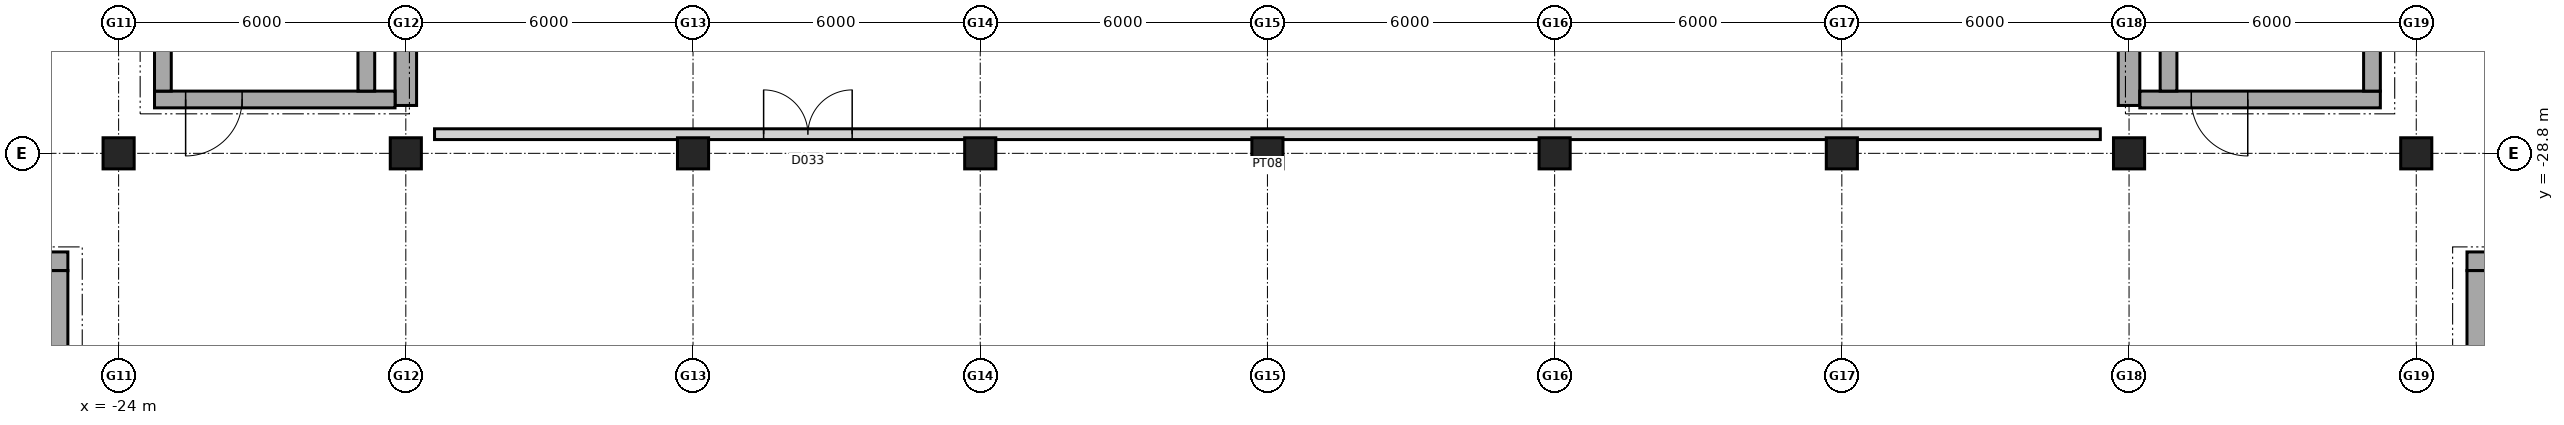
"""IFC4 building model, lengths in metres.
Left out: names, types, materials, properties, quantities, classifications, styles, units other than length and angle.
Written with IfcOpenShell. Run it as: python <this file> out.ifc"""

import sys

from ifc_helpers import new_model, si_unit, direction, frame, frame_2d, origin, origin_2d, place, context, subcontext, project, spatial, rectangle, extrude, element, fill, save


model = new_model("IFC4")
c1 = context("Model", 3, precision=1e-05, world=origin(), true_north=direction((0.0, 1.0)))
c2 = subcontext(c1, "Body", "Model", "MODEL_VIEW")
j1 = project(units=[si_unit("LENGTHUNIT", "METRE"), si_unit("PLANEANGLEUNIT", "RADIAN")], contexts=[c1])
p1 = place(None, origin())
s1 = spatial("IfcSite", under=j1, at=p1, CompositionType="ELEMENT")
p2 = place(p1, origin())
s2 = spatial("IfcBuilding", under=s1, at=p2, CompositionType="ELEMENT")
p3 = place(p2, frame((0.0, 0.0, 15.0)))
s3 = spatial("IfcBuildingStorey", under=s2, at=p3, CompositionType="ELEMENT", Elevation=15.0)
for number, where, z_axis, x_axis in (
    (1, (-24.0, -28.8, 0.0), (0.0, 0.0, 1.0), (1.0, 0.0, 0.0)),
    (2, (-18.0, -28.8, 0.0), (0.0, 0.0, 1.0), (1.0, 0.0, 0.0)),
    (3, (-12.0, -28.8, 0.0), (0.0, 0.0, 1.0), (1.0, 0.0, 0.0)),
    (4, (-6.0, -28.8, 0.0), (0.0, 0.0, 1.0), (1.0, 0.0, 0.0)),
    (5, (0.0, -28.8, 0.0), (0.0, 0.0, 1.0), (1.0, 0.0, 0.0)),
    (6, (6.0, -28.8, 0.0), (0.0, 0.0, 1.0), (1.0, 0.0, 0.0)),
    (7, (12.0, -28.8, 0.0), (0.0, 0.0, 1.0), (1.0, 0.0, 0.0)),
    (8, (18.0, -28.8, 0.0), (0.0, 0.0, 1.0), (1.0, 0.0, 0.0)),
    (9, (24.0, -28.8, 0.0), (0.0, 0.0, 1.0), (1.0, 0.0, 0.0)),
):
    element("IfcColumn", number, at=place(p3, frame(where, z_axis=z_axis, x_axis=x_axis)), inside=s3, PredefinedType="COLUMN", context=c2, shape_type="SweptSolid", body=[
        extrude(rectangle(XDim=0.65, YDim=0.65, at=origin_2d()), origin(), (0.0, 0.0, 1.0), 4.8),
    ])
for number, where, z_axis, x_axis in (
    (10, (-18.0, -27.8, 0.0), (0.0, 0.0, 1.0), (0.0, 1.0, 0.0)),
    (11, (18.0, -27.8, 0.0), (0.0, 0.0, 1.0), (0.0, 1.0, 0.0)),
):
    element("IfcWall", number, at=place(p3, frame(where, z_axis=z_axis, x_axis=x_axis)), inside=s3, PredefinedType="SHEAR", context=c2, shape_type="SweptSolid", body=[
        extrude(rectangle(XDim=18.6, YDim=0.45, at=frame_2d((9.3, 0.0))), origin(), (0.0, 0.0, 1.0), 4.8),
    ])
p4 = place(p3, frame((-18.225, -27.675, 0.0), z_axis=(0.0, 0.0, 1.0), x_axis=(-1.0, 0.0, 0.0)))
e12 = element("IfcWall", 12, at=p4, inside=s3, PredefinedType="SHEAR", context=c2, shape_type="SweptSolid", body=[
    extrude(rectangle(XDim=5.025, YDim=0.35, at=frame_2d((2.512, 0.0))), origin(), (0.0, 0.0, 1.0), 4.8),
])
p5 = place(p4, frame((3.195, 0.0, 0.0)))
e13 = element("IfcOpeningElement", 13, at=p5, cuts=e12, PredefinedType="OPENING", context=c2, shape_type="SweptSolid", body=[
    extrude(rectangle(XDim=1.18, YDim=2.15, at=frame_2d((0.59, 1.075))), frame((0.0, 0.185, 0.0), z_axis=(0.0, -1.0, 0.0), x_axis=(1.0, 0.0, 0.0)), (0.0, 0.0, 1.0), 0.37),
])
for number, where, z_axis, x_axis in (
    (14, (-23.075, -27.5, 0.0), (0.0, 0.0, 1.0), (0.0, 1.0, 0.0)),
    (15, (-18.825, -19.2, 0.0), (0.0, 0.0, 1.0), (0.0, -1.0, 0.0)),
):
    element("IfcWall", number, at=place(p3, frame(where, z_axis=z_axis, x_axis=x_axis)), inside=s3, PredefinedType="SHEAR", context=c2, shape_type="SweptSolid", body=[
        extrude(rectangle(XDim=8.3, YDim=0.35, at=frame_2d((4.15, 0.0))), origin(), (0.0, 0.0, 1.0), 4.8),
    ])
p6 = place(p3, frame((23.25, -27.675, 0.0), z_axis=(0.0, 0.0, 1.0), x_axis=(-1.0, 0.0, 0.0)))
e16 = element("IfcWall", 16, at=p6, inside=s3, PredefinedType="SHEAR", context=c2, shape_type="SweptSolid", body=[
    extrude(rectangle(XDim=5.025, YDim=0.35, at=frame_2d((2.512, 0.0))), origin(), (0.0, 0.0, 1.0), 4.8),
])
p7 = place(p6, frame((2.77, 0.0, 0.0)))
e17 = element("IfcOpeningElement", 17, at=p7, cuts=e16, PredefinedType="OPENING", context=c2, shape_type="SweptSolid", body=[
    extrude(rectangle(XDim=1.18, YDim=2.15, at=frame_2d((0.59, 1.075))), frame((0.0, 0.185, 0.0), z_axis=(0.0, -1.0, 0.0), x_axis=(1.0, 0.0, 0.0)), (0.0, 0.0, 1.0), 0.37),
])
for number, where, z_axis, x_axis in (
    (18, (18.825, -27.5, 0.0), (0.0, 0.0, 1.0), (0.0, 1.0, 0.0)),
    (19, (23.075, -19.2, 0.0), (0.0, 0.0, 1.0), (0.0, -1.0, 0.0)),
):
    element("IfcWall", number, at=place(p3, frame(where, z_axis=z_axis, x_axis=x_axis)), inside=s3, PredefinedType="SHEAR", context=c2, shape_type="SweptSolid", body=[
        extrude(rectangle(XDim=8.3, YDim=0.35, at=frame_2d((4.15, 0.0))), origin(), (0.0, 0.0, 1.0), 4.8),
    ])
p8 = place(p3, frame((-28.54, -31.055, 0.0), z_axis=(0.0, 0.0, 1.0), x_axis=(1.0, 0.0, 0.0)))
e20 = element("IfcWall", 20, at=p8, inside=s3, PredefinedType="SHEAR", context=c2, shape_type="SweptSolid", body=[
    extrude(rectangle(XDim=3.48, YDim=0.39, at=frame_2d((1.74, 0.0))), origin(), (0.0, 0.0, 1.0), 4.8),
])
p9 = place(p8, frame((1.19, 0.0, 0.0)))
e21 = element("IfcOpeningElement", 21, at=p9, cuts=e20, PredefinedType="OPENING", context=c2, shape_type="SweptSolid", body=[
    extrude(rectangle(XDim=1.1, YDim=2.15, at=frame_2d((0.55, 1.075))), frame((0.0, 0.205, 0.0), z_axis=(0.0, -1.0, 0.0), x_axis=(1.0, 0.0, 0.0)), (0.0, 0.0, 1.0), 0.41),
])
p10 = place(p3, frame((-25.255, -31.25, 0.0), z_axis=(0.0, 0.0, 1.0), x_axis=(0.0, -1.0, 0.0)))
e22 = element("IfcWall", 22, at=p10, inside=s3, PredefinedType="SHEAR", context=c2, shape_type="SweptSolid", body=[
    extrude(rectangle(XDim=2.3, YDim=0.39, at=frame_2d((1.15, 0.0))), origin(), (0.0, 0.0, 1.0), 4.8),
])
p11 = place(p3, frame((25.06, -31.055, 0.0), z_axis=(0.0, 0.0, 1.0), x_axis=(1.0, 0.0, 0.0)))
e23 = element("IfcWall", 23, at=p11, inside=s3, PredefinedType="SHEAR", context=c2, shape_type="SweptSolid", body=[
    extrude(rectangle(XDim=3.48, YDim=0.39, at=frame_2d((1.74, 0.0))), origin(), (0.0, 0.0, 1.0), 4.8),
])
p12 = place(p11, frame((1.19, 0.0, 0.0)))
e24 = element("IfcOpeningElement", 24, at=p12, cuts=e23, PredefinedType="OPENING", context=c2, shape_type="SweptSolid", body=[
    extrude(rectangle(XDim=1.1, YDim=2.15, at=frame_2d((0.55, 1.075))), frame((0.0, 0.205, 0.0), z_axis=(0.0, -1.0, 0.0), x_axis=(1.0, 0.0, 0.0)), (0.0, 0.0, 1.0), 0.41),
])
p13 = place(p3, frame((25.255, -33.55, 0.0), z_axis=(0.0, 0.0, 1.0), x_axis=(0.0, 1.0, 0.0)))
e25 = element("IfcWall", 25, at=p13, inside=s3, PredefinedType="SHEAR", context=c2, shape_type="SweptSolid", body=[
    extrude(rectangle(XDim=2.3, YDim=0.39, at=frame_2d((1.15, 0.0))), origin(), (0.0, 0.0, 1.0), 4.8),
])
p14 = place(p3, frame((-17.4, -28.4, 0.0), z_axis=(0.0, 0.0, 1.0), x_axis=(1.0, 0.0, 0.0)))
e26 = element("IfcWall", 26, at=p14, inside=s3, PredefinedType="PARTITIONING", context=c2, shape_type="SweptSolid", body=[
    extrude(rectangle(XDim=34.8, YDim=0.225, at=frame_2d((17.4, 0.0))), origin(), (0.0, 0.0, 1.0), 2.79),
])
p15 = place(p14, frame((6.875, 0.0, 0.0)))
e27 = element("IfcOpeningElement", 27, at=p15, cuts=e26, PredefinedType="OPENING", context=c2, shape_type="SweptSolid", body=[
    extrude(rectangle(XDim=1.85, YDim=2.3, at=frame_2d((0.925, 1.15))), frame((0.0, 0.123, 0.0), z_axis=(0.0, -1.0, 0.0), x_axis=(1.0, 0.0, 0.0)), (0.0, 0.0, 1.0), 0.245),
])
p16 = place(p5, origin())
e28 = element("IfcDoor", 28, at=p16, inside=s3, OperationType="SINGLE_SWING_RIGHT", PredefinedType="DOOR", context=c2, shape_type="SweptSolid", body=[
    extrude(rectangle(XDim=1.18, YDim=2.15, at=frame_2d((0.59, 1.075))), frame((0.0, 0.025, 0.0), z_axis=(0.0, -1.0, 0.0), x_axis=(1.0, 0.0, 0.0)), (0.0, 0.0, 1.0), 0.05),
])
fill(e13, e28)
p17 = place(p7, origin())
e29 = element("IfcDoor", 29, at=p17, inside=s3, OperationType="SINGLE_SWING_LEFT", PredefinedType="DOOR", context=c2, shape_type="SweptSolid", body=[
    extrude(rectangle(XDim=1.18, YDim=2.15, at=frame_2d((0.59, 1.075))), frame((0.0, 0.025, 0.0), z_axis=(0.0, -1.0, 0.0), x_axis=(1.0, 0.0, 0.0)), (0.0, 0.0, 1.0), 0.05),
])
fill(e17, e29)
p18 = place(p15, origin())
e30 = element("IfcDoor", 30, at=p18, inside=s3, OperationType="DOUBLE_DOOR_SINGLE_SWING", PredefinedType="DOOR", context=c2, shape_type="SweptSolid", body=[
    extrude(rectangle(XDim=1.85, YDim=2.3, at=frame_2d((0.925, 1.15))), frame((0.0, 0.025, 0.0), z_axis=(0.0, -1.0, 0.0), x_axis=(1.0, 0.0, 0.0)), (0.0, 0.0, 1.0), 0.05),
])
fill(e27, e30)
save(model, sys.argv[1])
